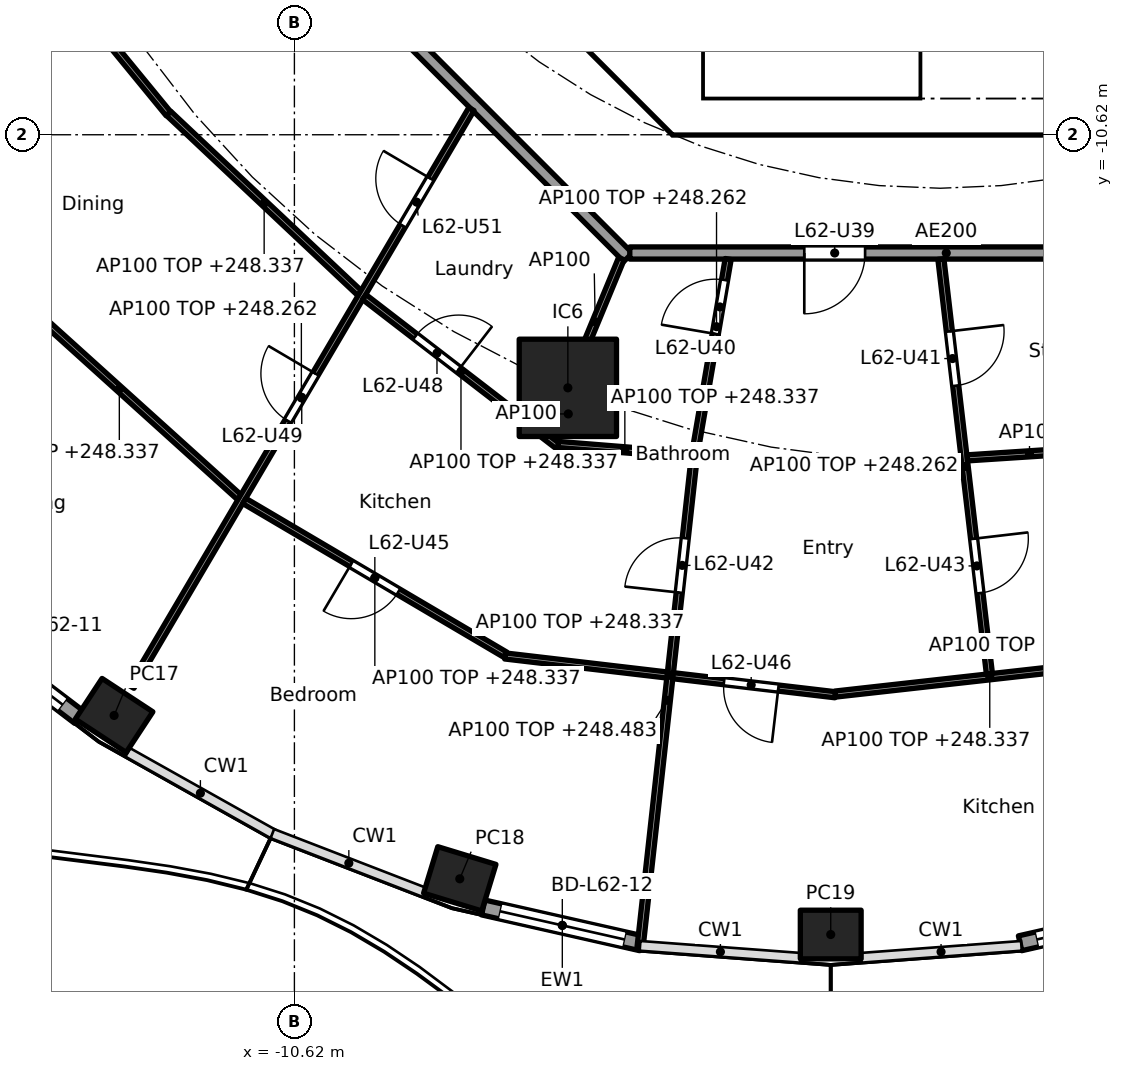
"""IFC4 building model, lengths in metres.
Left out: names, types, materials, properties, quantities, classifications, styles, units other than length and angle.
Written with IfcOpenShell. Run it as: python <this file> out.ifc"""

import sys

from ifc_helpers import new_model, si_unit, direction, frame, frame_2d, origin, origin_2d, place, context, subcontext, project, spatial, polyline, rectangle, hollow_rectangle, outline, extrude, element, fill, save


model = new_model("IFC4")
c1 = context("Model", 3, precision=1e-05, world=origin(), true_north=direction((0.0, 1.0)))
c2 = subcontext(c1, "Body", "Model", "MODEL_VIEW")
j1 = project(units=[si_unit("LENGTHUNIT", "METRE"), si_unit("PLANEANGLEUNIT", "RADIAN")], contexts=[c1])
p1 = place(None, origin())
s1 = spatial("IfcSite", under=j1, at=p1, CompositionType="ELEMENT")
p2 = place(p1, origin())
s2 = spatial("IfcBuilding", under=s1, at=p2, CompositionType="ELEMENT")
p3 = place(p2, frame((0.0, 0.0, 245.5)))
s3 = spatial("IfcBuildingStorey", under=s2, at=p3, CompositionType="ELEMENT", Elevation=245.5)
for number, where, z_axis, x_axis in (
    (1, (-13.585, -20.17, 0.0), (0.0, 0.0, 1.0), (0.836, -0.549, 0.0)),
    (2, (-7.9, -22.856, 0.0), (0.0, 0.0, 1.0), (0.957, -0.292, 0.0)),
    (3, (-1.8, -23.772, 0.0), (0.0, 0.0, 1.0), (1.0, 0.0, 0.0)),
):
    element("IfcColumn", number, at=place(p3, frame(where, z_axis=z_axis, x_axis=x_axis)), inside=s3, PredefinedType="COLUMN", context=c2, shape_type="SweptSolid", body=[
        extrude(hollow_rectangle(XDim=1.0, YDim=0.8, WallThickness=0.032, at=origin_2d()), origin(), (0.0, 0.0, 1.0), 3.7),
    ])
p4 = place(p3, frame((-6.123, -14.782, 0.0), z_axis=(0.0, 0.0, 1.0), x_axis=(1.0, 0.0, 0.0)))
e4 = element("IfcColumn", 4, at=p4, inside=s3, PredefinedType="COLUMN", context=c2, shape_type="SweptSolid", body=[
    extrude(rectangle(XDim=1.6, YDim=1.6, at=origin_2d()), origin(), (0.0, 0.0, 1.0), 3.7),
])
p5 = place(p3, frame((-14.157, -20.201, 0.0), z_axis=(0.0, 0.0, 1.0), x_axis=(-0.795990084031, 0.60530966135, 0.0)))
e5 = element("IfcWall", 5, at=p5, inside=s3, PredefinedType="SOLIDWALL", context=c2, shape_type="SweptSolid", body=[
    extrude(rectangle(XDim=2.789, YDim=0.25, at=frame_2d((1.394, 0.0))), origin(), (0.0, 0.0, 1.0), 3.44),
])
p6 = place(p5, frame((0.344, 0.0, 0.0)))
e6 = element("IfcOpeningElement", 6, at=p6, cuts=e5, PredefinedType="OPENING", context=c2, shape_type="SweptSolid", body=[
    extrude(rectangle(XDim=2.1, YDim=2.4, at=frame_2d((1.05, 1.2))), frame((0.0, 0.135, 0.0), z_axis=(0.0, -1.0, 0.0), x_axis=(1.0, 0.0, 0.0)), (0.0, 0.0, 1.0), 0.27),
])
p7 = place(p3, frame((-4.914, -23.916, 0.0), z_axis=(0.0, 0.0, 1.0), x_axis=(-0.975324089124, 0.220777990694, 0.0)))
e7 = element("IfcWall", 7, at=p7, inside=s3, PredefinedType="SOLIDWALL", context=c2, shape_type="SweptSolid", body=[
    extrude(rectangle(XDim=2.666, YDim=0.25, at=frame_2d((1.333, 0.0))), origin(), (0.0, 0.0, 1.0), 3.44),
])
p8 = place(p7, frame((0.283, 0.0, 0.0)))
e8 = element("IfcOpeningElement", 8, at=p8, cuts=e7, PredefinedType="OPENING", context=c2, shape_type="SweptSolid", body=[
    extrude(rectangle(XDim=2.1, YDim=2.4, at=frame_2d((1.05, 1.2))), frame((0.0, 0.135, 0.0), z_axis=(0.0, -1.0, 0.0), x_axis=(1.0, 0.0, 0.0)), (0.0, 0.0, 1.0), 0.27),
])
p9 = place(p3, frame((3.915, -23.327, 0.0), z_axis=(0.0, 0.0, 1.0), x_axis=(-0.975324089124, -0.220777990694, 0.0)))
e9 = element("IfcWall", 9, at=p9, inside=s3, PredefinedType="SOLIDWALL", context=c2, shape_type="SweptSolid", body=[
    extrude(rectangle(XDim=2.666, YDim=0.25, at=frame_2d((1.333, 0.0))), origin(), (0.0, 0.0, 1.0), 3.44),
])
p10 = place(p9, frame((0.283, 0.0, 0.0)))
e10 = element("IfcOpeningElement", 10, at=p10, cuts=e9, PredefinedType="OPENING", context=c2, shape_type="SweptSolid", body=[
    extrude(rectangle(XDim=2.1, YDim=2.4, at=frame_2d((1.05, 1.2))), frame((0.0, 0.135, 0.0), z_axis=(0.0, -1.0, 0.0), x_axis=(1.0, 0.0, 0.0)), (0.0, 0.0, 1.0), 0.27),
])
p11 = place(p3, frame((-9.988, -4.613, 0.0), z_axis=(0.0, 0.0, 1.0), x_axis=(0.707106781187, -0.707106781187, 0.0)))
e11 = element("IfcWall", 11, at=p11, inside=s3, PredefinedType="SHEAR", context=c2, shape_type="SweptSolid", body=[
    extrude(rectangle(XDim=7.602, YDim=0.6, at=frame_2d((3.801, 0.0))), origin(), (0.0, 0.0, 1.0), 3.44),
])
p12 = place(p11, frame((6.151, 0.0, 0.0)))
e12 = element("IfcOpeningElement", 12, at=p12, cuts=e11, PredefinedType="OPENING", context=c2, shape_type="SweptSolid", body=[
    extrude(rectangle(XDim=1.1, YDim=2.1, at=frame_2d((0.55, 1.05))), frame((0.0, 0.31, 0.0), z_axis=(0.0, -1.0, 0.0), x_axis=(1.0, 0.0, 0.0)), (0.0, 0.0, 1.0), 0.62),
])
p13 = place(p3, origin())
e13 = element("IfcWall", 13, at=p13, inside=s3, PredefinedType="SHEAR", context=c2, shape_type="SweptSolid", body=[
    extrude(outline(polyline([(-4.152, -10.025), (4.152, -10.025), (4.401, -9.776), (4.825, -10.2), (4.401, -10.625), (-4.401, -10.625), (-4.825, -10.2), (-4.401, -9.776), (-4.152, -10.025)])), origin(), (0.0, 0.0, 1.0), 3.44),
])
p14 = place(p3, origin())
e14 = element("IfcWall", 14, at=p14, inside=s3, PredefinedType="SOLIDWALL", context=c2, shape_type="SweptSolid", body=[
    extrude(outline(polyline([(-3.9, -10.025), (-4.1, -10.025), (-4.1, -7.025), (-3.9, -7.025), (-3.9, -10.025)])), origin(), (0.0, 0.0, 1.0), 3.44),
])
p15 = place(p3, frame((-12.635, -5.134, 0.0), z_axis=(0.0, 0.0, 1.0), x_axis=(0.707106781187, -0.707106781187, 0.0)))
e15 = element("IfcWall", 15, at=p15, inside=s3, PredefinedType="PARTITIONING", context=c2, shape_type="SweptSolid", body=[
    extrude(rectangle(XDim=10.609, YDim=0.2, at=frame_2d((5.305, 0.0))), origin(), (0.0, 0.0, 1.0), 3.44),
])
p16 = place(p3, frame((-5.104, -12.565, 0.0), z_axis=(0.0, 0.0, 1.0), x_axis=(1.0, 0.0, 0.0)))
e16 = element("IfcWall", 16, at=p16, inside=s3, PredefinedType="PARTITIONING", context=c2, shape_type="SweptSolid", body=[
    extrude(rectangle(XDim=10.409, YDim=0.2, at=frame_2d((5.205, 0.0))), origin(), (0.0, 0.0, 1.0), 3.44),
])
p17 = place(p16, frame((2.87, 0.0, 0.0)))
e17 = element("IfcOpeningElement", 17, at=p17, cuts=e16, PredefinedType="OPENING", context=c2, shape_type="SweptSolid", body=[
    extrude(rectangle(XDim=1.0, YDim=2.1, at=frame_2d((0.5, 1.05))), frame((0.0, 0.11, 0.0), z_axis=(0.0, -1.0, 0.0), x_axis=(1.0, 0.0, 0.0)), (0.0, 0.0, 1.0), 0.22),
])
p18 = place(p3, frame((-15.616, -6.708, 0.0), z_axis=(0.0, 0.0, 1.0), x_axis=(0.634076422357, -0.773270386483, 0.0)))
e18 = element("IfcWall", 18, at=p18, inside=s3, PredefinedType="PARTITIONING", context=c2, shape_type="SweptSolid", body=[
    extrude(rectangle(XDim=4.611, YDim=0.1, at=frame_2d((2.306, 0.0))), origin(), (0.0, 0.0, 1.0), 2.837),
])
p19 = place(p3, frame((-12.688, -10.27, 0.0), z_axis=(0.0, 0.0, 1.0), x_axis=(0.728268142903, -0.685292282192, 0.0)))
e19 = element("IfcWall", 19, at=p19, inside=s3, PredefinedType="PARTITIONING", context=c2, shape_type="SweptSolid", body=[
    extrude(rectangle(XDim=4.312, YDim=0.1, at=frame_2d((2.156, 0.0))), origin(), (0.0, 0.0, 1.0), 2.837),
])
p20 = place(p3, frame((-15.474, -13.019, 0.0), z_axis=(0.0, 0.0, 1.0), x_axis=(0.742348572616, -0.670013878017, 0.0)))
e20 = element("IfcWall", 20, at=p20, inside=s3, PredefinedType="PARTITIONING", context=c2, shape_type="SweptSolid", body=[
    extrude(rectangle(XDim=5.319, YDim=0.1, at=frame_2d((2.66, 0.0))), origin(), (0.0, 0.0, 1.0), 2.837),
])
p21 = place(p3, frame((-7.709, -10.198, 0.0), z_axis=(0.0, 0.0, 1.0), x_axis=(-0.507355901053, -0.8617366127, 0.0)))
e21 = element("IfcWall", 21, at=p21, inside=s3, PredefinedType="PARTITIONING", context=c2, shape_type="SweptSolid", body=[
    extrude(rectangle(XDim=11.025, YDim=0.1, at=frame_2d((5.512, 0.0))), origin(), (0.0, 0.0, 1.0), 2.762),
])
p22 = place(p21, frame((5.05, 0.0, 0.0)))
e22 = element("IfcOpeningElement", 22, at=p22, cuts=e21, PredefinedType="OPENING", context=c2, shape_type="SweptSolid", body=[
    extrude(rectangle(XDim=0.9, YDim=2.1, at=frame_2d((0.45, 1.05))), frame((0.0, 0.06, 0.0), z_axis=(0.0, -1.0, 0.0), x_axis=(1.0, 0.0, 0.0)), (0.0, 0.0, 1.0), 0.12),
])
p23 = place(p21, frame((1.326, 0.0, 0.0)))
e23 = element("IfcOpeningElement", 23, at=p23, cuts=e21, PredefinedType="OPENING", context=c2, shape_type="SweptSolid", body=[
    extrude(rectangle(XDim=0.9, YDim=2.1, at=frame_2d((0.45, 1.05))), frame((0.0, 0.06, 0.0), z_axis=(0.0, -1.0, 0.0), x_axis=(1.0, 0.0, 0.0)), (0.0, 0.0, 1.0), 0.12),
])
p24 = place(p3, frame((-9.471, -13.289, 0.0), z_axis=(0.0, 0.0, 1.0), x_axis=(0.792207964046, -0.610251211963, 0.0)))
e24 = element("IfcWall", 24, at=p24, inside=s3, PredefinedType="PARTITIONING", context=c2, shape_type="SweptSolid", body=[
    extrude(rectangle(XDim=4.016, YDim=0.1, at=frame_2d((2.008, 0.0))), origin(), (0.0, 0.0, 1.0), 2.837),
])
p25 = place(p24, frame((1.06, 0.0, 0.0)))
e25 = element("IfcOpeningElement", 25, at=p25, cuts=e24, PredefinedType="OPENING", context=c2, shape_type="SweptSolid", body=[
    extrude(rectangle(XDim=0.9, YDim=2.1, at=frame_2d((0.45, 1.05))), frame((0.0, 0.06, 0.0), z_axis=(0.0, -1.0, 0.0), x_axis=(1.0, 0.0, 0.0)), (0.0, 0.0, 1.0), 0.12),
])
p26 = place(p3, frame((-11.445, -16.641, 0.0), z_axis=(0.0, 0.0, 1.0), x_axis=(0.861562560957, -0.507651409489, 0.0)))
e26 = element("IfcWall", 26, at=p26, inside=s3, PredefinedType="PARTITIONING", context=c2, shape_type="SweptSolid", body=[
    extrude(rectangle(XDim=4.985, YDim=0.1, at=frame_2d((2.492, 0.0))), origin(), (0.0, 0.0, 1.0), 2.837),
])
p27 = place(p26, frame((2.042, 0.0, 0.0)))
e27 = element("IfcOpeningElement", 27, at=p27, cuts=e26, PredefinedType="OPENING", context=c2, shape_type="SweptSolid", body=[
    extrude(rectangle(XDim=0.9, YDim=2.1, at=frame_2d((0.45, 1.05))), frame((0.0, 0.06, 0.0), z_axis=(0.0, -1.0, 0.0), x_axis=(1.0, 0.0, 0.0)), (0.0, 0.0, 1.0), 0.12),
])
p28 = place(p3, frame((-5.243, -12.657, 0.0), z_axis=(0.0, 0.0, 1.0), x_axis=(-0.382719158442, -0.923864733477, 0.0)))
e28 = element("IfcWall", 28, at=p28, inside=s3, PredefinedType="PARTITIONING", context=c2, shape_type="SweptSolid", body=[
    extrude(rectangle(XDim=2.25, YDim=0.1, at=frame_2d((1.125, 0.0))), origin(), (0.0, 0.0, 1.0), 3.44),
])
p29 = place(p3, frame((-6.28, -15.713, 0.0), z_axis=(0.0, 0.0, 1.0), x_axis=(0.996788344289, -0.080081188115, 0.0)))
e29 = element("IfcWall", 29, at=p29, inside=s3, PredefinedType="PARTITIONING", context=c2, shape_type="SweptSolid", body=[
    extrude(rectangle(XDim=2.195, YDim=0.1, at=frame_2d((1.098, 0.0))), origin(), (0.0, 0.0, 1.0), 2.837),
])
p30 = place(p3, frame((-7.156, -19.191, 0.0), z_axis=(0.0, 0.0, 1.0), x_axis=(0.9931716165, -0.116662505458, 0.0)))
e30 = element("IfcWall", 30, at=p30, inside=s3, PredefinedType="PARTITIONING", context=c2, shape_type="SweptSolid", body=[
    extrude(rectangle(XDim=5.468, YDim=0.1, at=frame_2d((2.734, 0.0))), origin(), (0.0, 0.0, 1.0), 2.837),
])
p31 = place(p30, frame((3.626, 0.0, 0.0)))
e31 = element("IfcOpeningElement", 31, at=p31, cuts=e30, PredefinedType="OPENING", context=c2, shape_type="SweptSolid", body=[
    extrude(rectangle(XDim=0.9, YDim=2.1, at=frame_2d((0.45, 1.05))), frame((0.0, 0.06, 0.0), z_axis=(0.0, -1.0, 0.0), x_axis=(1.0, 0.0, 0.0)), (0.0, 0.0, 1.0), 0.12),
])
p32 = place(p3, frame((-3.487, -12.663, 0.0), z_axis=(0.0, 0.0, 1.0), x_axis=(-0.169450915465, -0.985538627984, 0.0)))
e32 = element("IfcWall", 32, at=p32, inside=s3, PredefinedType="PARTITIONING", context=c2, shape_type="SweptSolid", body=[
    extrude(rectangle(XDim=3.227, YDim=0.1, at=frame_2d((1.614, 0.0))), origin(), (0.0, 0.0, 1.0), 2.762),
])
p33 = place(p32, frame((0.35, 0.0, 0.0)))
e33 = element("IfcOpeningElement", 33, at=p33, cuts=e32, PredefinedType="OPENING", context=c2, shape_type="SweptSolid", body=[
    extrude(rectangle(XDim=0.9, YDim=2.1, at=frame_2d((0.45, 1.05))), frame((0.0, 0.06, 0.0), z_axis=(0.0, -1.0, 0.0), x_axis=(1.0, 0.0, 0.0)), (0.0, 0.0, 1.0), 0.12),
])
p34 = place(p3, frame((-4.036, -15.844, 0.0), z_axis=(0.0, 0.0, 1.0), x_axis=(-0.109804423508, -0.993953212469, 0.0)))
e34 = element("IfcWall", 34, at=p34, inside=s3, PredefinedType="PARTITIONING", context=c2, shape_type="SweptSolid", body=[
    extrude(rectangle(XDim=8.204, YDim=0.1, at=frame_2d((4.102, 0.0))), origin(), (0.0, 0.0, 1.0), 2.983),
])
p35 = place(p34, frame((1.419, 0.0, 0.0)))
e35 = element("IfcOpeningElement", 35, at=p35, cuts=e34, PredefinedType="OPENING", context=c2, shape_type="SweptSolid", body=[
    extrude(rectangle(XDim=0.9, YDim=2.1, at=frame_2d((0.45, 1.05))), frame((0.0, 0.06, 0.0), z_axis=(0.0, -1.0, 0.0), x_axis=(1.0, 0.0, 0.0)), (0.0, 0.0, 1.0), 0.12),
])
p36 = place(p3, frame((-1.726, -19.818, 0.0), z_axis=(0.0, 0.0, 1.0), x_axis=(0.99381893047, 0.111013212902, 0.0)))
e36 = element("IfcWall", 36, at=p36, inside=s3, PredefinedType="PARTITIONING", context=c2, shape_type="SweptSolid", body=[
    extrude(rectangle(XDim=5.113, YDim=0.1, at=frame_2d((2.557, 0.0))), origin(), (0.0, 0.0, 1.0), 2.837),
])
p37 = place(p3, frame((0.012, -12.664, 0.0), z_axis=(0.0, 0.0, 1.0), x_axis=(0.116154290925, -0.993231181901, 0.0)))
e37 = element("IfcWall", 37, at=p37, inside=s3, PredefinedType="PARTITIONING", context=c2, shape_type="SweptSolid", body=[
    extrude(rectangle(XDim=6.867, YDim=0.1, at=frame_2d((3.433, 0.0))), origin(), (0.0, 0.0, 1.0), 2.762),
])
p38 = place(p37, frame((1.198, 0.0, 0.0)))
e38 = element("IfcOpeningElement", 38, at=p38, cuts=e37, PredefinedType="OPENING", context=c2, shape_type="SweptSolid", body=[
    extrude(rectangle(XDim=0.9, YDim=2.1, at=frame_2d((0.45, 1.05))), frame((0.0, 0.06, 0.0), z_axis=(0.0, -1.0, 0.0), x_axis=(1.0, 0.0, 0.0)), (0.0, 0.0, 1.0), 0.12),
])
p39 = place(p37, frame((4.631, 0.0, 0.0)))
e39 = element("IfcOpeningElement", 39, at=p39, cuts=e37, PredefinedType="OPENING", context=c2, shape_type="SweptSolid", body=[
    extrude(rectangle(XDim=0.9, YDim=2.1, at=frame_2d((0.45, 1.05))), frame((0.0, 0.06, 0.0), z_axis=(0.0, -1.0, 0.0), x_axis=(1.0, 0.0, 0.0)), (0.0, 0.0, 1.0), 0.12),
])
p40 = place(p3, frame((0.444, -15.934, 0.0), z_axis=(0.0, 0.0, 1.0), x_axis=(0.997882958479, 0.065035384045, 0.0)))
e40 = element("IfcWall", 40, at=p40, inside=s3, PredefinedType="PARTITIONING", context=c2, shape_type="SweptSolid", body=[
    extrude(rectangle(XDim=2.053, YDim=0.1, at=frame_2d((1.027, 0.0))), origin(), (0.0, 0.0, 1.0), 3.44),
])
p41 = place(p3, frame((-6.196, -15.57, 0.0), z_axis=(0.0, 0.0, 1.0), x_axis=(0.217669318008, 0.976022575557, 0.0)))
e41 = element("IfcWall", 41, at=p41, inside=s3, PredefinedType="PARTITIONING", context=c2, shape_type="SweptSolid", body=[
    extrude(rectangle(XDim=0.735, YDim=0.1, at=frame_2d((0.367, 0.0))), origin(), (0.0, 0.0, 1.0), 3.44),
])
p42 = place(p6, origin())
e42 = element("IfcDoor", 42, at=p42, inside=s3, OperationType="SLIDING_TO_LEFT", PredefinedType="DOOR", context=c2, shape_type="SweptSolid", body=[
    extrude(rectangle(XDim=2.1, YDim=2.4, at=frame_2d((1.05, 1.2))), frame((0.0, 0.025, 0.0), z_axis=(0.0, -1.0, 0.0), x_axis=(1.0, 0.0, 0.0)), (0.0, 0.0, 1.0), 0.05),
])
fill(e6, e42)
p43 = place(p8, origin())
e43 = element("IfcDoor", 43, at=p43, inside=s3, OperationType="SLIDING_TO_LEFT", PredefinedType="DOOR", context=c2, shape_type="SweptSolid", body=[
    extrude(rectangle(XDim=2.1, YDim=2.4, at=frame_2d((1.05, 1.2))), frame((0.0, 0.025, 0.0), z_axis=(0.0, -1.0, 0.0), x_axis=(1.0, 0.0, 0.0)), (0.0, 0.0, 1.0), 0.05),
])
fill(e8, e43)
p44 = place(p10, origin())
e44 = element("IfcDoor", 44, at=p44, inside=s3, OperationType="SLIDING_TO_LEFT", PredefinedType="DOOR", context=c2, shape_type="SweptSolid", body=[
    extrude(rectangle(XDim=2.1, YDim=2.4, at=frame_2d((1.05, 1.2))), frame((0.0, 0.025, 0.0), z_axis=(0.0, -1.0, 0.0), x_axis=(1.0, 0.0, 0.0)), (0.0, 0.0, 1.0), 0.05),
])
fill(e10, e44)
p45 = place(p12, origin())
e45 = element("IfcDoor", 45, at=p45, inside=s3, OperationType="SINGLE_SWING_RIGHT", PredefinedType="DOOR", context=c2, shape_type="SweptSolid", body=[
    extrude(rectangle(XDim=1.1, YDim=2.1, at=frame_2d((0.55, 1.05))), frame((0.0, 0.025, 0.0), z_axis=(0.0, -1.0, 0.0), x_axis=(1.0, 0.0, 0.0)), (0.0, 0.0, 1.0), 0.05),
])
fill(e12, e45)
p46 = place(p17, frame((1.0, 0.0, 0.0), x_axis=(-1.0, 0.0, 0.0)))
e46 = element("IfcDoor", 46, at=p46, inside=s3, OperationType="SINGLE_SWING_RIGHT", PredefinedType="DOOR", context=c2, shape_type="SweptSolid", body=[
    extrude(rectangle(XDim=1.0, YDim=2.1, at=frame_2d((0.5, 1.05))), frame((0.0, 0.025, 0.0), z_axis=(0.0, -1.0, 0.0), x_axis=(1.0, 0.0, 0.0)), (0.0, 0.0, 1.0), 0.05),
])
fill(e17, e46)
p47 = place(p33, frame((0.9, 0.0, 0.0), x_axis=(-1.0, 0.0, 0.0)))
e47 = element("IfcDoor", 47, at=p47, inside=s3, OperationType="SINGLE_SWING_LEFT", PredefinedType="DOOR", context=c2, shape_type="SweptSolid", body=[
    extrude(rectangle(XDim=0.9, YDim=2.1, at=frame_2d((0.45, 1.05))), frame((0.0, 0.025, 0.0), z_axis=(0.0, -1.0, 0.0), x_axis=(1.0, 0.0, 0.0)), (0.0, 0.0, 1.0), 0.05),
])
fill(e33, e47)
p48 = place(p38, origin())
e48 = element("IfcDoor", 48, at=p48, inside=s3, OperationType="SINGLE_SWING_LEFT", PredefinedType="DOOR", context=c2, shape_type="SweptSolid", body=[
    extrude(rectangle(XDim=0.9, YDim=2.1, at=frame_2d((0.45, 1.05))), frame((0.0, 0.025, 0.0), z_axis=(0.0, -1.0, 0.0), x_axis=(1.0, 0.0, 0.0)), (0.0, 0.0, 1.0), 0.05),
])
fill(e38, e48)
p49 = place(p35, frame((0.9, 0.0, 0.0), x_axis=(-1.0, 0.0, 0.0)))
e49 = element("IfcDoor", 49, at=p49, inside=s3, OperationType="SINGLE_SWING_LEFT", PredefinedType="DOOR", context=c2, shape_type="SweptSolid", body=[
    extrude(rectangle(XDim=0.9, YDim=2.1, at=frame_2d((0.45, 1.05))), frame((0.0, 0.025, 0.0), z_axis=(0.0, -1.0, 0.0), x_axis=(1.0, 0.0, 0.0)), (0.0, 0.0, 1.0), 0.05),
])
fill(e35, e49)
p50 = place(p39, origin())
e50 = element("IfcDoor", 50, at=p50, inside=s3, OperationType="SINGLE_SWING_LEFT", PredefinedType="DOOR", context=c2, shape_type="SweptSolid", body=[
    extrude(rectangle(XDim=0.9, YDim=2.1, at=frame_2d((0.45, 1.05))), frame((0.0, 0.025, 0.0), z_axis=(0.0, -1.0, 0.0), x_axis=(1.0, 0.0, 0.0)), (0.0, 0.0, 1.0), 0.05),
])
fill(e39, e50)
p51 = place(p27, frame((0.9, 0.0, 0.0), x_axis=(-1.0, 0.0, 0.0)))
e51 = element("IfcDoor", 51, at=p51, inside=s3, OperationType="SINGLE_SWING_RIGHT", PredefinedType="DOOR", context=c2, shape_type="SweptSolid", body=[
    extrude(rectangle(XDim=0.9, YDim=2.1, at=frame_2d((0.45, 1.05))), frame((0.0, 0.025, 0.0), z_axis=(0.0, -1.0, 0.0), x_axis=(1.0, 0.0, 0.0)), (0.0, 0.0, 1.0), 0.05),
])
fill(e27, e51)
p52 = place(p31, frame((0.9, 0.0, 0.0), x_axis=(-1.0, 0.0, 0.0)))
e52 = element("IfcDoor", 52, at=p52, inside=s3, OperationType="SINGLE_SWING_LEFT", PredefinedType="DOOR", context=c2, shape_type="SweptSolid", body=[
    extrude(rectangle(XDim=0.9, YDim=2.1, at=frame_2d((0.45, 1.05))), frame((0.0, 0.025, 0.0), z_axis=(0.0, -1.0, 0.0), x_axis=(1.0, 0.0, 0.0)), (0.0, 0.0, 1.0), 0.05),
])
fill(e31, e52)
p53 = place(p25, origin())
e53 = element("IfcDoor", 53, at=p53, inside=s3, OperationType="SINGLE_SWING_RIGHT", PredefinedType="DOOR", context=c2, shape_type="SweptSolid", body=[
    extrude(rectangle(XDim=0.9, YDim=2.1, at=frame_2d((0.45, 1.05))), frame((0.0, 0.025, 0.0), z_axis=(0.0, -1.0, 0.0), x_axis=(1.0, 0.0, 0.0)), (0.0, 0.0, 1.0), 0.05),
])
fill(e25, e53)
p54 = place(p22, frame((0.9, 0.0, 0.0), x_axis=(-1.0, 0.0, 0.0)))
e54 = element("IfcDoor", 54, at=p54, inside=s3, OperationType="SINGLE_SWING_RIGHT", PredefinedType="DOOR", context=c2, shape_type="SweptSolid", body=[
    extrude(rectangle(XDim=0.9, YDim=2.1, at=frame_2d((0.45, 1.05))), frame((0.0, 0.025, 0.0), z_axis=(0.0, -1.0, 0.0), x_axis=(1.0, 0.0, 0.0)), (0.0, 0.0, 1.0), 0.05),
])
fill(e22, e54)
p55 = place(p23, frame((0.9, 0.0, 0.0), x_axis=(-1.0, 0.0, 0.0)))
e55 = element("IfcDoor", 55, at=p55, inside=s3, OperationType="SINGLE_SWING_RIGHT", PredefinedType="DOOR", context=c2, shape_type="SweptSolid", body=[
    extrude(rectangle(XDim=0.9, YDim=2.1, at=frame_2d((0.45, 1.05))), frame((0.0, 0.025, 0.0), z_axis=(0.0, -1.0, 0.0), x_axis=(1.0, 0.0, 0.0)), (0.0, 0.0, 1.0), 0.05),
])
fill(e23, e55)
save(model, sys.argv[1])
